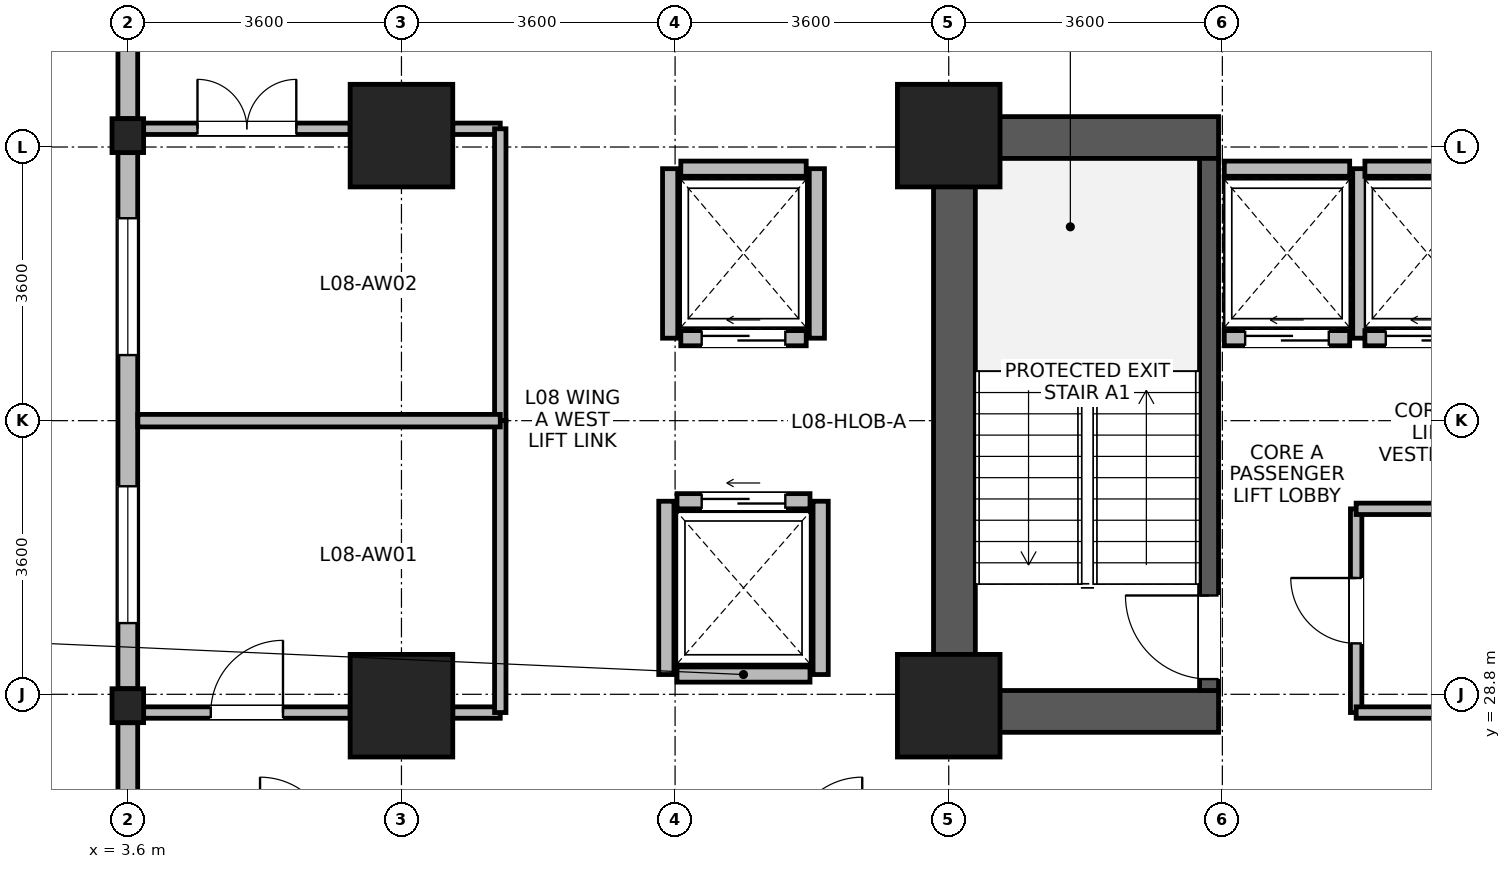
"""IFC4 building model, lengths in metres.
Left out: names, types, materials, properties, quantities, classifications, styles, units other than length and angle.
Written with IfcOpenShell. Run it as: python <this file> out.ifc"""

import sys

from ifc_helpers import new_model, si_unit, direction, frame, frame_2d, origin, origin_2d, place, context, subcontext, project, spatial, rectangle, i_section, extrude, source, transform, mapped, element, fill, save


model = new_model("IFC4")
c1 = context("Model", 3, precision=1e-05, world=origin(), true_north=direction((0.0, 1.0)))
c2 = subcontext(c1, "Body", "Model", "MODEL_VIEW")
j1 = project(units=[si_unit("LENGTHUNIT", "METRE"), si_unit("PLANEANGLEUNIT", "RADIAN")], contexts=[c1])
p1 = place(None, origin())
s1 = spatial("IfcSite", under=j1, at=p1, CompositionType="ELEMENT")
p2 = place(p1, origin())
s2 = spatial("IfcBuilding", under=s1, at=p2, CompositionType="ELEMENT")
p3 = place(p2, frame((0.0, 0.0, 36.4)))
s3 = spatial("IfcBuildingStorey", under=s2, at=p3, CompositionType="ELEMENT", Elevation=36.4)
p4 = place(p3, frame((14.475, 28.3, 0.0), z_axis=(0.0, 0.0, 1.0), x_axis=(0.0, 1.0, 0.0)))
e1 = element("IfcWall", 1, at=p4, inside=s3, PredefinedType="SHEAR", context=c2, shape_type="SweptSolid", body=[
    extrude(rectangle(XDim=8.1, YDim=0.55, at=frame_2d((4.05, 0.0))), origin(), (0.0, 0.0, 1.0), 3.45),
])
for number, where, z_axis, x_axis in (
    (2, (14.75, 28.575, 0.0), (0.0, 0.0, 1.0), (1.0, 0.0, 0.0)),
    (3, (14.75, 36.125, 0.0), (0.0, 0.0, 1.0), (1.0, 0.0, 0.0)),
):
    element("IfcWall", number, at=place(p3, frame(where, z_axis=z_axis, x_axis=x_axis)), inside=s3, PredefinedType="SHEAR", context=c2, shape_type="SweptSolid", body=[
        extrude(rectangle(XDim=3.2, YDim=0.55, at=frame_2d((1.6, 0.0))), origin(), (0.0, 0.0, 1.0), 3.45),
    ])
p5 = place(p3, frame((17.825, 28.85, 0.0), z_axis=(0.0, 0.0, 1.0), x_axis=(0.0, 1.0, 0.0)))
e4 = element("IfcWall", 4, at=p5, inside=s3, PredefinedType="SHEAR", context=c2, shape_type="SweptSolid", body=[
    extrude(rectangle(XDim=7.0, YDim=0.25, at=frame_2d((3.5, 0.0))), origin(), (0.0, 0.0, 1.0), 3.45),
])
p6 = place(p5, frame((0.15, 0.0, 0.0)))
e5 = element("IfcOpeningElement", 5, at=p6, cuts=e4, PredefinedType="OPENING", context=c2, shape_type="SweptSolid", body=[
    extrude(rectangle(XDim=1.1, YDim=2.08, at=frame_2d((0.55, 1.04))), frame((0.0, 0.135, 0.0), z_axis=(0.0, -1.0, 0.0), x_axis=(1.0, 0.0, 0.0)), (0.0, 0.0, 1.0), 0.27),
])
m1 = source(origin(), c2, "Body", "SweptSolid", [
    extrude(rectangle(XDim=1.35, YDim=1.35, at=origin_2d()), origin(), (0.0, 0.0, 1.0), 3.7),
])
for number, where, z_axis, x_axis in (
    (6, (7.2, 28.65, 0.0), (0.0, 0.0, 1.0), (1.0, 0.0, 0.0)),
    (7, (7.2, 36.15, 0.0), (0.0, 0.0, 1.0), (1.0, 0.0, 0.0)),
    (8, (14.4, 28.65, 0.0), (0.0, 0.0, 1.0), (1.0, 0.0, 0.0)),
    (9, (14.4, 36.15, 0.0), (0.0, 0.0, 1.0), (1.0, 0.0, 0.0)),
):
    element("IfcColumn", number, at=place(p3, frame(where, z_axis=z_axis, x_axis=x_axis)), inside=s3, PredefinedType="COLUMN", context=c2, shape_type="MappedRepresentation", body=[
        mapped(m1, transform((0.0, 0.0, 0.0), x_axis=(1.0, 0.0, 0.0), y_axis=(0.0, 1.0, 0.0), z_axis=(0.0, 0.0, 1.0), scale=1.0)),
    ])
m2 = source(origin(), c2, "Body", "SweptSolid", [
    extrude(i_section(OverallWidth=0.416, OverallDepth=0.446, WebThickness=0.029, FlangeThickness=0.04, FilletRadius=0.015, at=origin_2d()), origin(), (0.0, 0.0, 1.0), 3.7),
])
for number, where, z_axis, x_axis in (
    (10, (3.6, 28.65, 0.0), (0.0, 0.0, 1.0), (1.0, 0.0, 0.0)),
    (11, (3.6, 36.15, 0.0), (0.0, 0.0, 1.0), (1.0, 0.0, 0.0)),
):
    element("IfcColumn", number, at=place(p3, frame(where, z_axis=z_axis, x_axis=x_axis)), inside=s3, PredefinedType="COLUMN", context=c2, shape_type="MappedRepresentation", body=[
        mapped(m2, transform((0.0, 0.0, 0.0), x_axis=(1.0, 0.0, 0.0), y_axis=(0.0, 1.0, 0.0), z_axis=(0.0, 0.0, 1.0), scale=1.0)),
    ])
p7 = place(p3, frame((3.6, 36.374, 0.0), z_axis=(0.0, 0.0, 1.0), x_axis=(0.0, 1.0, 0.0)))
e12 = element("IfcWall", 12, at=p7, inside=s3, PredefinedType="STANDARD", context=c2, shape_type="SweptSolid", body=[
    extrude(rectangle(XDim=6.956, YDim=0.26, at=frame_2d((3.478, 0.0))), origin(), (0.0, 0.0, 1.0), 3.43),
])
p8 = place(p7, frame((4.317, 0.0, 0.85)))
e13 = element("IfcOpeningElement", 13, at=p8, cuts=e12, PredefinedType="OPENING", context=c2, shape_type="SweptSolid", body=[
    extrude(rectangle(XDim=1.8, YDim=1.85, at=frame_2d((0.9, 0.925))), frame((0.0, 0.14, 0.0), z_axis=(0.0, -1.0, 0.0), x_axis=(1.0, 0.0, 0.0)), (0.0, 0.0, 1.0), 0.28),
])
p9 = place(p7, frame((3.003, 0.0, 0.85)))
e14 = element("IfcOpeningElement", 14, at=p9, cuts=e12, PredefinedType="OPENING", context=c2, shape_type="SweptSolid", body=[
    extrude(rectangle(XDim=0.95, YDim=1.75, at=frame_2d((0.475, 0.875))), frame((0.0, 0.14, 0.0), z_axis=(0.0, -1.0, 0.0), x_axis=(1.0, 0.0, 0.0)), (0.0, 0.0, 1.0), 0.28),
])
p10 = place(p3, frame((3.6, 28.874, 0.0), z_axis=(0.0, 0.0, 1.0), x_axis=(0.0, 1.0, 0.0)))
e15 = element("IfcWall", 15, at=p10, inside=s3, PredefinedType="STANDARD", context=c2, shape_type="SweptSolid", body=[
    extrude(rectangle(XDim=7.052, YDim=0.26, at=frame_2d((3.526, 0.0))), origin(), (0.0, 0.0, 1.0), 2.93),
])
p11 = place(p10, frame((0.863, 0.0, 0.85)))
e16 = element("IfcOpeningElement", 16, at=p11, cuts=e15, PredefinedType="OPENING", context=c2, shape_type="SweptSolid", body=[
    extrude(rectangle(XDim=1.8, YDim=1.85, at=frame_2d((0.9, 0.925))), frame((0.0, 0.14, 0.0), z_axis=(0.0, -1.0, 0.0), x_axis=(1.0, 0.0, 0.0)), (0.0, 0.0, 1.0), 0.28),
])
p12 = place(p10, frame((4.389, 0.0, 0.85)))
e17 = element("IfcOpeningElement", 17, at=p12, cuts=e15, PredefinedType="OPENING", context=c2, shape_type="SweptSolid", body=[
    extrude(rectangle(XDim=1.8, YDim=1.85, at=frame_2d((0.9, 0.925))), frame((0.0, 0.14, 0.0), z_axis=(0.0, -1.0, 0.0), x_axis=(1.0, 0.0, 0.0)), (0.0, 0.0, 1.0), 0.28),
])
p13 = place(p3, frame((3.6, 21.47, 0.0), z_axis=(0.0, 0.0, 1.0), x_axis=(0.0, 1.0, 0.0)))
e18 = element("IfcWall", 18, at=p13, inside=s3, PredefinedType="STANDARD", context=c2, shape_type="SweptSolid", body=[
    extrude(rectangle(XDim=6.956, YDim=0.26, at=frame_2d((3.478, 0.0))), origin(), (0.0, 0.0, 1.0), 3.43),
])
p14 = place(p13, frame((0.839, 0.0, 0.85)))
e19 = element("IfcOpeningElement", 19, at=p14, cuts=e18, PredefinedType="OPENING", context=c2, shape_type="SweptSolid", body=[
    extrude(rectangle(XDim=1.8, YDim=1.85, at=frame_2d((0.9, 0.925))), frame((0.0, 0.14, 0.0), z_axis=(0.0, -1.0, 0.0), x_axis=(1.0, 0.0, 0.0)), (0.0, 0.0, 1.0), 0.28),
])
p15 = place(p13, frame((3.003, 0.0, 0.85)))
e20 = element("IfcOpeningElement", 20, at=p15, cuts=e18, PredefinedType="OPENING", context=c2, shape_type="SweptSolid", body=[
    extrude(rectangle(XDim=0.95, YDim=1.75, at=frame_2d((0.475, 0.875))), frame((0.0, 0.14, 0.0), z_axis=(0.0, -1.0, 0.0), x_axis=(1.0, 0.0, 0.0)), (0.0, 0.0, 1.0), 0.28),
])
p16 = place(p3, frame((18.025, 33.485, 0.0), z_axis=(0.0, 0.0, 1.0), x_axis=(1.0, 0.0, 0.0)))
e21 = element("IfcWall", 21, at=p16, inside=s3, PredefinedType="PARTITIONING", context=c2, shape_type="SweptSolid", body=[
    extrude(rectangle(XDim=1.65, YDim=0.2, at=frame_2d((0.825, 0.0))), origin(), (0.0, 0.0, 1.0), 3.43),
])
p17 = place(p16, frame((0.275, 0.0, 0.0)))
e22 = element("IfcOpeningElement", 22, at=p17, cuts=e21, PredefinedType="OPENING", context=c2, shape_type="SweptSolid", body=[
    extrude(rectangle(XDim=1.1, YDim=2.12, at=frame_2d((0.55, 1.06))), frame((0.0, 0.11, 0.0), z_axis=(0.0, -1.0, 0.0), x_axis=(1.0, 0.0, 0.0)), (0.0, 0.0, 1.0), 0.22),
])
p18 = place(p3, frame((18.025, 35.715, 0.0), z_axis=(0.0, 0.0, 1.0), x_axis=(1.0, 0.0, 0.0)))
e23 = element("IfcWall", 23, at=p18, inside=s3, PredefinedType="PARTITIONING", context=c2, shape_type="SweptSolid", body=[
    extrude(rectangle(XDim=1.65, YDim=0.2, at=frame_2d((0.825, 0.0))), origin(), (0.0, 0.0, 1.0), 2.23),
])
p19 = place(p3, frame((19.815, 33.485, 0.0), z_axis=(0.0, 0.0, 1.0), x_axis=(0.0, 1.0, 0.0)))
e24 = element("IfcWall", 24, at=p19, inside=s3, PredefinedType="PARTITIONING", context=c2, shape_type="SweptSolid", body=[
    extrude(rectangle(XDim=2.23, YDim=0.2, at=frame_2d((1.115, 0.0))), origin(), (0.0, 0.0, 1.0), 3.43),
])
p20 = place(p3, frame((19.875, 33.485, 0.0), z_axis=(0.0, 0.0, 1.0), x_axis=(1.0, 0.0, 0.0)))
e25 = element("IfcWall", 25, at=p20, inside=s3, PredefinedType="PARTITIONING", context=c2, shape_type="SweptSolid", body=[
    extrude(rectangle(XDim=1.65, YDim=0.2, at=frame_2d((0.825, 0.0))), origin(), (0.0, 0.0, 1.0), 3.43),
])
p21 = place(p20, frame((0.275, 0.0, 0.0)))
e26 = element("IfcOpeningElement", 26, at=p21, cuts=e25, PredefinedType="OPENING", context=c2, shape_type="SweptSolid", body=[
    extrude(rectangle(XDim=1.1, YDim=2.12, at=frame_2d((0.55, 1.06))), frame((0.0, 0.11, 0.0), z_axis=(0.0, -1.0, 0.0), x_axis=(1.0, 0.0, 0.0)), (0.0, 0.0, 1.0), 0.22),
])
p22 = place(p3, frame((19.875, 35.715, 0.0), z_axis=(0.0, 0.0, 1.0), x_axis=(1.0, 0.0, 0.0)))
e27 = element("IfcWall", 27, at=p22, inside=s3, PredefinedType="PARTITIONING", context=c2, shape_type="SweptSolid", body=[
    extrude(rectangle(XDim=1.65, YDim=0.2, at=frame_2d((0.825, 0.0))), origin(), (0.0, 0.0, 1.0), 2.23),
])
p23 = place(p3, frame((10.825, 29.06, 0.0), z_axis=(0.0, 0.0, 1.0), x_axis=(1.0, 0.0, 0.0)))
e28 = element("IfcWall", 28, at=p23, inside=s3, PredefinedType="PARTITIONING", context=c2, shape_type="SweptSolid", body=[
    extrude(rectangle(XDim=1.75, YDim=0.2, at=frame_2d((0.875, 0.0))), origin(), (0.0, 0.0, 1.0), 3.43),
])
p24 = place(p3, frame((10.825, 31.34, 0.0), z_axis=(0.0, 0.0, 1.0), x_axis=(1.0, 0.0, 0.0)))
e29 = element("IfcWall", 29, at=p24, inside=s3, PredefinedType="PARTITIONING", context=c2, shape_type="SweptSolid", body=[
    extrude(rectangle(XDim=1.75, YDim=0.2, at=frame_2d((0.875, 0.0))), origin(), (0.0, 0.0, 1.0), 3.43),
])
p25 = place(p24, frame((0.325, 0.0, 0.0)))
e30 = element("IfcOpeningElement", 30, at=p25, cuts=e29, PredefinedType="OPENING", context=c2, shape_type="SweptSolid", body=[
    extrude(rectangle(XDim=1.1, YDim=2.12, at=frame_2d((0.55, 1.06))), frame((0.0, 0.11, 0.0), z_axis=(0.0, -1.0, 0.0), x_axis=(1.0, 0.0, 0.0)), (0.0, 0.0, 1.0), 0.22),
])
for number, where, z_axis, x_axis in (
    (31, (10.685, 29.06, 0.0), (0.0, 0.0, 1.0), (0.0, 1.0, 0.0)),
    (32, (12.715, 29.06, 0.0), (0.0, 0.0, 1.0), (0.0, 1.0, 0.0)),
):
    element("IfcWall", number, at=place(p3, frame(where, z_axis=z_axis, x_axis=x_axis)), inside=s3, PredefinedType="PARTITIONING", context=c2, shape_type="SweptSolid", body=[
        extrude(rectangle(XDim=2.28, YDim=0.2, at=frame_2d((1.14, 0.0))), origin(), (0.0, 0.0, 1.0), 3.43),
    ])
p26 = place(p3, frame((10.875, 33.485, 0.0), z_axis=(0.0, 0.0, 1.0), x_axis=(1.0, 0.0, 0.0)))
e33 = element("IfcWall", 33, at=p26, inside=s3, PredefinedType="PARTITIONING", context=c2, shape_type="SweptSolid", body=[
    extrude(rectangle(XDim=1.65, YDim=0.2, at=frame_2d((0.825, 0.0))), origin(), (0.0, 0.0, 1.0), 3.43),
])
p27 = place(p26, frame((0.275, 0.0, 0.0)))
e34 = element("IfcOpeningElement", 34, at=p27, cuts=e33, PredefinedType="OPENING", context=c2, shape_type="SweptSolid", body=[
    extrude(rectangle(XDim=1.1, YDim=2.12, at=frame_2d((0.55, 1.06))), frame((0.0, 0.11, 0.0), z_axis=(0.0, -1.0, 0.0), x_axis=(1.0, 0.0, 0.0)), (0.0, 0.0, 1.0), 0.22),
])
p28 = place(p3, frame((10.875, 35.715, 0.0), z_axis=(0.0, 0.0, 1.0), x_axis=(1.0, 0.0, 0.0)))
e35 = element("IfcWall", 35, at=p28, inside=s3, PredefinedType="PARTITIONING", context=c2, shape_type="SweptSolid", body=[
    extrude(rectangle(XDim=1.65, YDim=0.2, at=frame_2d((0.825, 0.0))), origin(), (0.0, 0.0, 1.0), 3.43),
])
for number, where, z_axis, x_axis in (
    (36, (10.735, 33.485, 0.0), (0.0, 0.0, 1.0), (0.0, 1.0, 0.0)),
    (37, (12.665, 33.485, 0.0), (0.0, 0.0, 1.0), (0.0, 1.0, 0.0)),
):
    element("IfcWall", number, at=place(p3, frame(where, z_axis=z_axis, x_axis=x_axis)), inside=s3, PredefinedType="PARTITIONING", context=c2, shape_type="SweptSolid", body=[
        extrude(rectangle(XDim=2.23, YDim=0.2, at=frame_2d((1.115, 0.0))), origin(), (0.0, 0.0, 1.0), 3.43),
    ])
p29 = place(p3, frame((3.808, 28.56, 0.0), z_axis=(0.0, 0.0, 1.0), x_axis=(1.0, 0.0, 0.0)))
e38 = element("IfcWall", 38, at=p29, inside=s3, PredefinedType="PARTITIONING", context=c2, shape_type="SweptSolid", body=[
    extrude(rectangle(XDim=2.717, YDim=0.15, at=frame_2d((1.358, 0.0))), origin(), (0.0, 0.0, 1.0), 2.78),
])
p30 = place(p29, frame((0.884, 0.0, 0.0)))
e39 = element("IfcOpeningElement", 39, at=p30, cuts=e38, PredefinedType="OPENING", context=c2, shape_type="SweptSolid", body=[
    extrude(rectangle(XDim=0.95, YDim=2.1, at=frame_2d((0.475, 1.05))), frame((0.0, 0.085, 0.0), z_axis=(0.0, -1.0, 0.0), x_axis=(1.0, 0.0, 0.0)), (0.0, 0.0, 1.0), 0.17),
])
p31 = place(p3, frame((7.875, 28.56, 0.0), z_axis=(0.0, 0.0, 1.0), x_axis=(1.0, 0.0, 0.0)))
e40 = element("IfcWall", 40, at=p31, inside=s3, PredefinedType="PARTITIONING", context=c2, shape_type="SweptSolid", body=[
    extrude(rectangle(XDim=0.625, YDim=0.15, at=frame_2d((0.312, 0.0))), origin(), (0.0, 0.0, 1.0), 2.78),
])
p32 = place(p3, frame((3.808, 36.24, 0.0), z_axis=(0.0, 0.0, 1.0), x_axis=(1.0, 0.0, 0.0)))
e41 = element("IfcWall", 41, at=p32, inside=s3, PredefinedType="PARTITIONING", context=c2, shape_type="SweptSolid", body=[
    extrude(rectangle(XDim=2.717, YDim=0.15, at=frame_2d((1.358, 0.0))), origin(), (0.0, 0.0, 1.0), 2.78),
])
p33 = place(p32, frame((0.708, 0.0, 0.0)))
e42 = element("IfcOpeningElement", 42, at=p33, cuts=e41, PredefinedType="OPENING", context=c2, shape_type="SweptSolid", body=[
    extrude(rectangle(XDim=1.3, YDim=2.12, at=frame_2d((0.65, 1.06))), frame((0.0, 0.085, 0.0), z_axis=(0.0, -1.0, 0.0), x_axis=(1.0, 0.0, 0.0)), (0.0, 0.0, 1.0), 0.17),
])
p34 = place(p3, frame((7.875, 36.24, 0.0), z_axis=(0.0, 0.0, 1.0), x_axis=(1.0, 0.0, 0.0)))
e43 = element("IfcWall", 43, at=p34, inside=s3, PredefinedType="PARTITIONING", context=c2, shape_type="SweptSolid", body=[
    extrude(rectangle(XDim=0.625, YDim=0.15, at=frame_2d((0.312, 0.0))), origin(), (0.0, 0.0, 1.0), 2.78),
])
p35 = place(p3, frame((8.5, 32.4, 0.0), z_axis=(0.0, 0.0, 1.0), x_axis=(0.0, 1.0, 0.0)))
e44 = element("IfcWall", 44, at=p35, inside=s3, PredefinedType="PARTITIONING", context=c2, shape_type="SweptSolid", body=[
    extrude(rectangle(XDim=3.84, YDim=0.15, at=frame_2d((1.92, 0.0))), origin(), (0.0, 0.0, 1.0), 3.43),
])
p36 = place(p3, frame((8.5, 28.56, 0.0), z_axis=(0.0, 0.0, 1.0), x_axis=(0.0, 1.0, 0.0)))
e45 = element("IfcWall", 45, at=p36, inside=s3, PredefinedType="PARTITIONING", context=c2, shape_type="SweptSolid", body=[
    extrude(rectangle(XDim=3.84, YDim=0.15, at=frame_2d((1.92, 0.0))), origin(), (0.0, 0.0, 1.0), 3.43),
])
p37 = place(p3, frame((19.76, 28.56, 0.0), z_axis=(0.0, 0.0, 1.0), x_axis=(0.0, 1.0, 0.0)))
e46 = element("IfcWall", 46, at=p37, inside=s3, PredefinedType="PARTITIONING", context=c2, shape_type="SweptSolid", body=[
    extrude(rectangle(XDim=2.68, YDim=0.15, at=frame_2d((1.34, 0.0))), origin(), (0.0, 0.0, 1.0), 3.43),
])
p38 = place(p37, frame((0.91, 0.0, 0.0)))
e47 = element("IfcOpeningElement", 47, at=p38, cuts=e46, PredefinedType="OPENING", context=c2, shape_type="SweptSolid", body=[
    extrude(rectangle(XDim=0.86, YDim=2.02, at=frame_2d((0.43, 1.01))), frame((0.0, 0.085, 0.0), z_axis=(0.0, -1.0, 0.0), x_axis=(1.0, 0.0, 0.0)), (0.0, 0.0, 1.0), 0.17),
])
p39 = place(p3, frame((19.76, 28.56, 0.0), z_axis=(0.0, 0.0, 1.0), x_axis=(1.0, 0.0, 0.0)))
e48 = element("IfcWall", 48, at=p39, inside=s3, PredefinedType="PARTITIONING", context=c2, shape_type="SweptSolid", body=[
    extrude(rectangle(XDim=2.0, YDim=0.15, at=frame_2d((1.0, 0.0))), origin(), (0.0, 0.0, 1.0), 2.23),
])
p40 = place(p3, frame((19.76, 31.24, 0.0), z_axis=(0.0, 0.0, 1.0), x_axis=(1.0, 0.0, 0.0)))
e49 = element("IfcWall", 49, at=p40, inside=s3, PredefinedType="PARTITIONING", context=c2, shape_type="SweptSolid", body=[
    extrude(rectangle(XDim=2.0, YDim=0.15, at=frame_2d((1.0, 0.0))), origin(), (0.0, 0.0, 1.0), 3.43),
])
p41 = place(p3, frame((3.732, 32.4, 0.0), z_axis=(0.0, 0.0, 1.0), x_axis=(1.0, 0.0, 0.0)))
e50 = element("IfcWall", 50, at=p41, inside=s3, PredefinedType="PARTITIONING", context=c2, shape_type="SweptSolid", body=[
    extrude(rectangle(XDim=4.768, YDim=0.165, at=frame_2d((2.384, 0.0))), origin(), (0.0, 0.0, 1.0), 3.43),
])
p42 = place(p11, origin())
e51 = element("IfcWindow", 51, at=p42, inside=s3, PartitioningType="SINGLE_PANEL", PredefinedType="WINDOW", context=c2, shape_type="SweptSolid", body=[
    extrude(rectangle(XDim=1.8, YDim=1.85, at=frame_2d((0.9, 0.925))), frame((0.0, 0.03, 0.0), z_axis=(0.0, -1.0, 0.0), x_axis=(1.0, 0.0, 0.0)), (0.0, 0.0, 1.0), 0.06),
])
fill(e16, e51)
p43 = place(p12, origin())
e52 = element("IfcWindow", 52, at=p43, inside=s3, PartitioningType="SINGLE_PANEL", PredefinedType="WINDOW", context=c2, shape_type="SweptSolid", body=[
    extrude(rectangle(XDim=1.8, YDim=1.85, at=frame_2d((0.9, 0.925))), frame((0.0, 0.03, 0.0), z_axis=(0.0, -1.0, 0.0), x_axis=(1.0, 0.0, 0.0)), (0.0, 0.0, 1.0), 0.06),
])
fill(e17, e52)
p44 = place(p6, origin())
e53 = element("IfcDoor", 53, at=p44, inside=s3, OperationType="SINGLE_SWING_RIGHT", PredefinedType="DOOR", context=c2, shape_type="SweptSolid", body=[
    extrude(rectangle(XDim=1.1, YDim=2.08, at=frame_2d((0.55, 1.04))), frame((0.0, 0.025, 0.0), z_axis=(0.0, -1.0, 0.0), x_axis=(1.0, 0.0, 0.0)), (0.0, 0.0, 1.0), 0.05),
])
fill(e5, e53)
p45 = place(p17, origin())
e54 = element("IfcDoor", 54, at=p45, inside=s3, OperationType="SLIDING_TO_LEFT", PredefinedType="DOOR", context=c2, shape_type="SweptSolid", body=[
    extrude(rectangle(XDim=1.1, YDim=2.12, at=frame_2d((0.55, 1.06))), frame((0.0, 0.025, 0.0), z_axis=(0.0, -1.0, 0.0), x_axis=(1.0, 0.0, 0.0)), (0.0, 0.0, 1.0), 0.05),
])
fill(e22, e54)
p46 = place(p21, origin())
e55 = element("IfcDoor", 55, at=p46, inside=s3, OperationType="SLIDING_TO_LEFT", PredefinedType="DOOR", context=c2, shape_type="SweptSolid", body=[
    extrude(rectangle(XDim=1.1, YDim=2.12, at=frame_2d((0.55, 1.06))), frame((0.0, 0.025, 0.0), z_axis=(0.0, -1.0, 0.0), x_axis=(1.0, 0.0, 0.0)), (0.0, 0.0, 1.0), 0.05),
])
fill(e26, e55)
p47 = place(p25, origin())
e56 = element("IfcDoor", 56, at=p47, inside=s3, OperationType="SLIDING_TO_LEFT", PredefinedType="DOOR", context=c2, shape_type="SweptSolid", body=[
    extrude(rectangle(XDim=1.1, YDim=2.12, at=frame_2d((0.55, 1.06))), frame((0.0, 0.025, 0.0), z_axis=(0.0, -1.0, 0.0), x_axis=(1.0, 0.0, 0.0)), (0.0, 0.0, 1.0), 0.05),
])
fill(e30, e56)
p48 = place(p27, origin())
e57 = element("IfcDoor", 57, at=p48, inside=s3, OperationType="SLIDING_TO_LEFT", PredefinedType="DOOR", context=c2, shape_type="SweptSolid", body=[
    extrude(rectangle(XDim=1.1, YDim=2.12, at=frame_2d((0.55, 1.06))), frame((0.0, 0.025, 0.0), z_axis=(0.0, -1.0, 0.0), x_axis=(1.0, 0.0, 0.0)), (0.0, 0.0, 1.0), 0.05),
])
fill(e34, e57)
p49 = place(p30, origin())
e58 = element("IfcDoor", 58, at=p49, inside=s3, OperationType="SINGLE_SWING_RIGHT", PredefinedType="DOOR", context=c2, shape_type="SweptSolid", body=[
    extrude(rectangle(XDim=0.95, YDim=2.1, at=frame_2d((0.475, 1.05))), frame((0.0, 0.025, 0.0), z_axis=(0.0, -1.0, 0.0), x_axis=(1.0, 0.0, 0.0)), (0.0, 0.0, 1.0), 0.05),
])
fill(e39, e58)
p50 = place(p33, origin())
e59 = element("IfcDoor", 59, at=p50, inside=s3, OperationType="DOUBLE_DOOR_SINGLE_SWING", PredefinedType="DOOR", context=c2, shape_type="SweptSolid", body=[
    extrude(rectangle(XDim=1.3, YDim=2.12, at=frame_2d((0.65, 1.06))), frame((0.0, 0.025, 0.0), z_axis=(0.0, -1.0, 0.0), x_axis=(1.0, 0.0, 0.0)), (0.0, 0.0, 1.0), 0.05),
])
fill(e42, e59)
p51 = place(p38, origin())
e60 = element("IfcDoor", 60, at=p51, inside=s3, OperationType="SINGLE_SWING_RIGHT", PredefinedType="DOOR", context=c2, shape_type="SweptSolid", body=[
    extrude(rectangle(XDim=0.86, YDim=2.02, at=frame_2d((0.43, 1.01))), frame((0.0, 0.025, 0.0), z_axis=(0.0, -1.0, 0.0), x_axis=(1.0, 0.0, 0.0)), (0.0, 0.0, 1.0), 0.05),
])
fill(e47, e60)
save(model, sys.argv[1])
